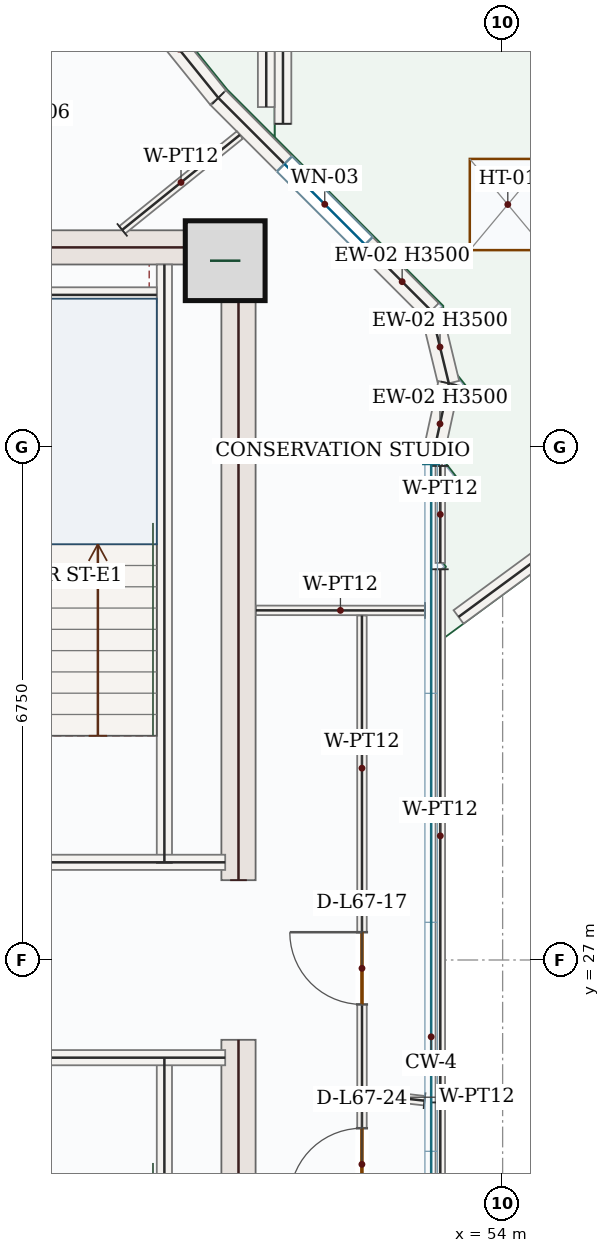
"""IFC4 building model, lengths in metres.
Left out: names, types, materials, properties, quantities, classifications, styles, units other than length and angle.
Written with IfcOpenShell. Run it as: python <this file> out.ifc"""

import sys

from ifc_helpers import new_model, si_unit, direction, frame, frame_2d, origin, origin_2d, place, context, subcontext, project, spatial, rectangle, extrude, source, transform, mapped, element, fill, save


model = new_model("IFC4")
c1 = context("Model", 3, precision=1e-05, world=origin(), true_north=direction((0.0, 1.0)))
c2 = subcontext(c1, "Body", "Model", "MODEL_VIEW")
j1 = project(units=[si_unit("LENGTHUNIT", "METRE"), si_unit("PLANEANGLEUNIT", "RADIAN")], contexts=[c1])
p1 = place(None, origin())
s1 = spatial("IfcSite", under=j1, at=p1, CompositionType="ELEMENT")
p2 = place(p1, origin())
s2 = spatial("IfcBuilding", under=s1, at=p2, CompositionType="ELEMENT")
p3 = place(p2, frame((0.0, 0.0, 280.35)))
s3 = spatial("IfcBuildingStorey", under=s2, at=p3, CompositionType="ELEMENT", Elevation=280.35)
m1 = source(origin(), c2, "Body", "SweptSolid", [
    extrude(rectangle(XDim=8.55, YDim=0.45, at=frame_2d((4.275, 0.0))), origin(), (0.0, 0.0, 1.0), 3.5),
])
for number, where, z_axis, x_axis in (
    (1, (50.525, 17.4, 0.0), (0.0, 0.0, 1.0), (0.0, 1.0, 0.0)),
    (2, (50.525, 28.05, 0.0), (0.0, 0.0, 1.0), (0.0, 1.0, 0.0)),
):
    element("IfcWall", number, at=place(p3, frame(where, z_axis=z_axis, x_axis=x_axis)), inside=s3, PredefinedType="SHEAR", context=c2, shape_type="MappedRepresentation", body=[
        mapped(m1, transform((0.0, 0.0, 0.0), x_axis=(1.0, 0.0, 0.0), y_axis=(0.0, 1.0, 0.0), z_axis=(0.0, 0.0, 1.0), scale=1.0)),
    ])
m2 = source(origin(), c2, "Body", "SweptSolid", [
    extrude(rectangle(XDim=7.1, YDim=0.45, at=frame_2d((3.55, 0.0))), origin(), (0.0, 0.0, 1.0), 3.5),
])
p4 = place(p3, frame((43.2, 36.375, 0.0), z_axis=(0.0, 0.0, 1.0), x_axis=(1.0, 0.0, 0.0)))
e3 = element("IfcWall", 3, at=p4, inside=s3, PredefinedType="SHEAR", context=c2, shape_type="MappedRepresentation", body=[
    mapped(m2, transform((0.0, 0.0, 0.0), x_axis=(1.0, 0.0, 0.0), y_axis=(0.0, 1.0, 0.0), z_axis=(0.0, 0.0, 1.0), scale=1.0)),
])
m3 = source(origin(), c2, "Body", "SweptSolid", [
    extrude(rectangle(XDim=1.05, YDim=1.05, at=origin_2d()), origin(), (0.0, 0.0, 1.0), 3.75),
])
p5 = place(p3, frame((50.35, 36.2, 0.0), z_axis=(0.0, 0.0, 1.0), x_axis=(1.0, 0.0, 0.0)))
e4 = element("IfcColumn", 4, at=p5, inside=s3, PredefinedType="COLUMN", context=c2, shape_type="MappedRepresentation", body=[
    mapped(m3, transform((0.0, 0.0, 0.0), x_axis=(1.0, 0.0, 0.0), y_axis=(0.0, 1.0, 0.0), z_axis=(0.0, 0.0, 1.0), scale=1.0)),
])
m4 = source(origin(), c2, "Body", "SweptSolid", [
    extrude(rectangle(XDim=9.514, YDim=0.22, at=frame_2d((4.757, 0.0))), origin(), (0.0, 0.0, 1.0), 1.2),
])
p6 = place(p3, frame((51.11, 43.737, 0.0), z_axis=(0.0, 0.0, 1.0), x_axis=(0.592724500616, -0.805405280818, 0.0)))
e5 = element("IfcWall", 5, at=p6, inside=s3, PredefinedType="PARAPET", context=c2, shape_type="MappedRepresentation", body=[
    mapped(m4, transform((0.0, 0.0, 0.0), x_axis=(1.0, 0.0, 0.0), y_axis=(0.0, 1.0, 0.0), z_axis=(0.0, 0.0, 1.0), scale=1.0)),
])
m5 = source(origin(), c2, "Body", "SweptSolid", [
    extrude(rectangle(XDim=3.685, YDim=0.22, at=frame_2d((1.842, 0.0))), origin(), (0.0, 0.0, 1.0), 1.2),
])
p7 = place(p3, frame((56.388, 33.697, 0.0), z_axis=(0.0, 0.0, 1.0), x_axis=(-0.805437043351, -0.592681338662, 0.0)))
e6 = element("IfcWall", 6, at=p7, inside=s3, PredefinedType="PARAPET", context=c2, shape_type="MappedRepresentation", body=[
    mapped(m5, transform((0.0, 0.0, 0.0), x_axis=(1.0, 0.0, 0.0), y_axis=(0.0, 1.0, 0.0), z_axis=(0.0, 0.0, 1.0), scale=1.0)),
])
m6 = source(origin(), c2, "Body", "SweptSolid", [
    extrude(rectangle(XDim=5.736, YDim=0.22, at=frame_2d((2.868, 0.0))), origin(), (0.0, 0.0, 1.0), 1.2),
])
p8 = place(p3, frame((51.11, 38.001, 0.0), z_axis=(0.0, 0.0, 1.0), x_axis=(0.0, 1.0, 0.0)))
e7 = element("IfcWall", 7, at=p8, inside=s3, PredefinedType="PARAPET", context=c2, shape_type="MappedRepresentation", body=[
    mapped(m6, transform((0.0, 0.0, 0.0), x_axis=(1.0, 0.0, 0.0), y_axis=(0.0, 1.0, 0.0), z_axis=(0.0, 0.0, 1.0), scale=1.0)),
])
m7 = source(origin(), c2, "Body", "SweptSolid", [
    extrude(rectangle(XDim=5.815, YDim=0.22, at=frame_2d((2.907, 0.0))), origin(), (0.0, 0.0, 1.0), 1.2),
])
p9 = place(p3, frame((50.89, 44.036, 0.0), z_axis=(0.0, 0.0, 1.0), x_axis=(0.0, -1.0, 0.0)))
e8 = element("IfcWall", 8, at=p9, inside=s3, PredefinedType="PARAPET", context=c2, shape_type="MappedRepresentation", body=[
    mapped(m7, transform((0.0, 0.0, 0.0), x_axis=(1.0, 0.0, 0.0), y_axis=(0.0, 1.0, 0.0), z_axis=(0.0, 0.0, 1.0), scale=1.0)),
])
p10 = place(p3, frame((47.06, 42.305, 0.0), z_axis=(0.0, 0.0, 1.0), x_axis=(0.628225517447, -0.778031297075, 0.0)))
e9 = element("IfcWall", 9, at=p10, inside=s3, PredefinedType="SOLIDWALL", context=c2, shape_type="SweptSolid", body=[
    extrude(rectangle(XDim=5.093, YDim=0.28, at=frame_2d((2.546, 0.0))), origin(), (0.0, 0.0, 1.0), 3.5),
])
p11 = place(p10, frame((1.796, 0.0, 0.85)))
e10 = element("IfcOpeningElement", 10, at=p11, cuts=e9, PredefinedType="OPENING", context=c2, shape_type="SweptSolid", body=[
    extrude(rectangle(XDim=1.5, YDim=1.5, at=frame_2d((0.75, 0.75))), frame((0.0, 0.15, 0.0), z_axis=(0.0, -1.0, 0.0), x_axis=(1.0, 0.0, 0.0)), (0.0, 0.0, 1.0), 0.3),
])
p12 = place(p3, frame((50.26, 38.342, 0.0), z_axis=(0.0, 0.0, 1.0), x_axis=(0.707106781187, -0.707106781187, 0.0)))
e11 = element("IfcWall", 11, at=p12, inside=s3, PredefinedType="SOLIDWALL", context=c2, shape_type="SweptSolid", body=[
    extrude(rectangle(XDim=3.96, YDim=0.28, at=frame_2d((1.98, 0.0))), origin(), (0.0, 0.0, 1.0), 3.5),
])
p13 = place(p12, frame((1.23, 0.0, 0.85)))
e12 = element("IfcOpeningElement", 12, at=p13, cuts=e11, PredefinedType="OPENING", context=c2, shape_type="SweptSolid", body=[
    extrude(rectangle(XDim=1.5, YDim=1.5, at=frame_2d((0.75, 0.75))), frame((0.0, 0.15, 0.0), z_axis=(0.0, -1.0, 0.0), x_axis=(1.0, 0.0, 0.0)), (0.0, 0.0, 1.0), 0.3),
])
m8 = source(origin(), c2, "Body", "SweptSolid", [
    extrude(rectangle(XDim=0.983, YDim=0.28, at=frame_2d((0.492, 0.0))), origin(), (0.0, 0.0, 1.0), 3.5),
])
p14 = place(p3, frame((53.06, 35.542, 0.0), z_axis=(0.0, 0.0, 1.0), x_axis=(0.235870049888, -0.971784605541, 0.0)))
e13 = element("IfcWall", 13, at=p14, inside=s3, PredefinedType="SOLIDWALL", context=c2, shape_type="MappedRepresentation", body=[
    mapped(m8, transform((0.0, 0.0, 0.0), x_axis=(1.0, 0.0, 0.0), y_axis=(0.0, 1.0, 0.0), z_axis=(0.0, 0.0, 1.0), scale=1.0)),
])
m9 = source(origin(), c2, "Body", "SweptSolid", [
    extrude(rectangle(XDim=1.091, YDim=0.28, at=frame_2d((0.545, 0.0))), origin(), (0.0, 0.0, 1.0), 3.5),
])
p15 = place(p3, frame((53.292, 34.586, 0.0), z_axis=(0.0, 0.0, 1.0), x_axis=(-0.212661978508, -0.977125827566, 0.0)))
e14 = element("IfcWall", 14, at=p15, inside=s3, PredefinedType="SOLIDWALL", context=c2, shape_type="MappedRepresentation", body=[
    mapped(m9, transform((0.0, 0.0, 0.0), x_axis=(1.0, 0.0, 0.0), y_axis=(0.0, 1.0, 0.0), z_axis=(0.0, 0.0, 1.0), scale=1.0)),
])
m10 = source(origin(), c2, "Body", "SweptSolid", [
    extrude(rectangle(XDim=7.87, YDim=0.2, at=frame_2d((3.935, 0.0))), origin(), (0.0, 0.0, 1.0), 3.5),
])
for number, where, z_axis, x_axis in (
    (15, (49.55, 17.85, 0.0), (0.0, 0.0, 1.0), (0.0, 1.0, 0.0)),
    (16, (49.55, 28.28, 0.0), (0.0, 0.0, 1.0), (0.0, 1.0, 0.0)),
):
    element("IfcWall", number, at=place(p3, frame(where, z_axis=z_axis, x_axis=x_axis)), inside=s3, PredefinedType="SOLIDWALL", context=c2, shape_type="MappedRepresentation", body=[
        mapped(m10, transform((0.0, 0.0, 0.0), x_axis=(1.0, 0.0, 0.0), y_axis=(0.0, 1.0, 0.0), z_axis=(0.0, 0.0, 1.0), scale=1.0)),
    ])
m11 = source(origin(), c2, "Body", "SweptSolid", [
    extrude(rectangle(XDim=4.25, YDim=0.2, at=frame_2d((2.125, 0.0))), origin(), (0.0, 0.0, 1.0), 3.5),
])
for number, where, z_axis, x_axis in (
    (17, (46.1, 25.715, 0.0), (0.0, 0.0, 1.0), (1.0, 0.0, 0.0)),
    (18, (46.1, 28.285, 0.0), (0.0, 0.0, 1.0), (1.0, 0.0, 0.0)),
):
    element("IfcWall", number, at=place(p3, frame(where, z_axis=z_axis, x_axis=x_axis)), inside=s3, PredefinedType="SOLIDWALL", context=c2, shape_type="MappedRepresentation", body=[
        mapped(m11, transform((0.0, 0.0, 0.0), x_axis=(1.0, 0.0, 0.0), y_axis=(0.0, 1.0, 0.0), z_axis=(0.0, 0.0, 1.0), scale=1.0)),
    ])
m12 = source(origin(), c2, "Body", "SweptSolid", [
    extrude(rectangle(XDim=3.25, YDim=0.2, at=frame_2d((1.625, 0.0))), origin(), (0.0, 0.0, 1.0), 3.5),
])
p16 = place(p3, frame((46.2, 35.75, 0.0), z_axis=(0.0, 0.0, 1.0), x_axis=(1.0, 0.0, 0.0)))
e19 = element("IfcWall", 19, at=p16, inside=s3, PredefinedType="SOLIDWALL", context=c2, shape_type="MappedRepresentation", body=[
    mapped(m12, transform((0.0, 0.0, 0.0), x_axis=(1.0, 0.0, 0.0), y_axis=(0.0, 1.0, 0.0), z_axis=(0.0, 0.0, 1.0), scale=1.0)),
])
m13 = source(origin(), c2, "Body", "SweptSolid", [
    extrude(rectangle(XDim=2.223, YDim=0.125, at=frame_2d((1.111, 0.0))), origin(), (0.0, 0.0, 1.0), 3.5),
])
p17 = place(p3, frame((52.978, 31.598, 0.0), z_axis=(0.0, 0.0, 1.0), x_axis=(-0.999999704402, 0.000768892567, 0.0)))
e20 = element("IfcWall", 20, at=p17, inside=s3, PredefinedType="PARTITIONING", context=c2, shape_type="MappedRepresentation", body=[
    mapped(m13, transform((0.0, 0.0, 0.0), x_axis=(1.0, 0.0, 0.0), y_axis=(0.0, 1.0, 0.0), z_axis=(0.0, 0.0, 1.0), scale=1.0)),
])
m14 = source(origin(), c2, "Body", "SweptSolid", [
    extrude(rectangle(XDim=1.989, YDim=0.125, at=frame_2d((0.995, 0.0))), origin(), (0.0, 0.0, 1.0), 3.5),
])
p18 = place(p3, frame((48.995, 36.605, 0.0), z_axis=(0.0, 0.0, 1.0), x_axis=(0.778058853423, 0.628191388519, 0.0)))
e21 = element("IfcWall", 21, at=p18, inside=s3, PredefinedType="PARTITIONING", context=c2, shape_type="MappedRepresentation", body=[
    mapped(m14, transform((0.0, 0.0, 0.0), x_axis=(1.0, 0.0, 0.0), y_axis=(0.0, 1.0, 0.0), z_axis=(0.0, 0.0, 1.0), scale=1.0)),
])
m15 = source(origin(), c2, "Body", "SweptSolid", [
    extrude(rectangle(XDim=1.276, YDim=0.125, at=frame_2d((0.638, 0.0))), origin(), (0.0, 0.0, 1.0), 3.5),
])
p19 = place(p3, frame((53.18, 33.5, 0.0), z_axis=(0.0, 0.0, 1.0), x_axis=(0.0, -1.0, 0.0)))
e22 = element("IfcWall", 22, at=p19, inside=s3, PredefinedType="PARTITIONING", context=c2, shape_type="MappedRepresentation", body=[
    mapped(m15, transform((0.0, 0.0, 0.0), x_axis=(1.0, 0.0, 0.0), y_axis=(0.0, 1.0, 0.0), z_axis=(0.0, 0.0, 1.0), scale=1.0)),
])
m16 = source(origin(), c2, "Body", "SweptSolid", [
    extrude(rectangle(XDim=7.014, YDim=0.125, at=frame_2d((3.507, 0.0))), origin(), (0.0, 0.0, 1.0), 3.5),
])
p20 = place(p3, frame((53.18, 32.14, 0.0), z_axis=(0.0, 0.0, 1.0), x_axis=(0.0, -1.0, 0.0)))
e23 = element("IfcWall", 23, at=p20, inside=s3, PredefinedType="PARTITIONING", context=c2, shape_type="MappedRepresentation", body=[
    mapped(m16, transform((0.0, 0.0, 0.0), x_axis=(1.0, 0.0, 0.0), y_axis=(0.0, 1.0, 0.0), z_axis=(0.0, 0.0, 1.0), scale=1.0)),
])
m17 = source(origin(), c2, "Body", "SweptSolid", [
    extrude(rectangle(XDim=0.828, YDim=0.125, at=frame_2d((0.414, 0.0))), origin(), (0.0, 0.0, 1.0), 3.5),
])
p21 = place(p3, frame((52.972, 25.149, 0.0), z_axis=(0.0, 0.0, 1.0), x_axis=(-0.993862130166, 0.110625793652, 0.0)))
e24 = element("IfcWall", 24, at=p21, inside=s3, PredefinedType="PARTITIONING", context=c2, shape_type="MappedRepresentation", body=[
    mapped(m17, transform((0.0, 0.0, 0.0), x_axis=(1.0, 0.0, 0.0), y_axis=(0.0, 1.0, 0.0), z_axis=(0.0, 0.0, 1.0), scale=1.0)),
])
p22 = place(p3, frame((52.15, 25.24, 0.0), z_axis=(0.0, 0.0, 1.0), x_axis=(-0.000155231293, 0.999999987952, 0.0)))
e25 = element("IfcWall", 25, at=p22, inside=s3, PredefinedType="PARTITIONING", context=c2, shape_type="SweptSolid", body=[
    extrude(rectangle(XDim=6.291, YDim=0.125, at=frame_2d((3.146, 0.0))), origin(), (0.0, 0.0, 1.0), 3.5),
])
p23 = place(p22, frame((1.175, 0.0, 0.0)))
e26 = element("IfcOpeningElement", 26, at=p23, cuts=e25, PredefinedType="OPENING", context=c2, shape_type="SweptSolid", body=[
    extrude(rectangle(XDim=0.95, YDim=2.15, at=frame_2d((0.475, 1.075))), frame((0.0, 0.073, 0.0), z_axis=(0.0, -1.0, 0.0), x_axis=(1.0, 0.0, 0.0)), (0.0, 0.0, 1.0), 0.145),
])
p24 = place(p3, frame((52.146, 22.468, 0.0), z_axis=(0.0, 0.0, 1.0), x_axis=(0.001263765014, 0.999999201449, 0.0)))
e27 = element("IfcWall", 27, at=p24, inside=s3, PredefinedType="PARTITIONING", context=c2, shape_type="SweptSolid", body=[
    extrude(rectangle(XDim=2.705, YDim=0.125, at=frame_2d((1.352, 0.0))), origin(), (0.0, 0.0, 1.0), 3.5),
])
p25 = place(p24, frame((1.369, 0.0, 0.0)))
e28 = element("IfcOpeningElement", 28, at=p25, cuts=e27, PredefinedType="OPENING", context=c2, shape_type="SweptSolid", body=[
    extrude(rectangle(XDim=0.95, YDim=2.15, at=frame_2d((0.475, 1.075))), frame((0.0, 0.073, 0.0), z_axis=(0.0, -1.0, 0.0), x_axis=(1.0, 0.0, 0.0)), (0.0, 0.0, 1.0), 0.145),
])
m18 = source(origin(), c2, "Body", "SweptSolid", [
    extrude(rectangle(XDim=6.718, YDim=0.125, at=frame_2d((3.359, 0.0))), origin(), (0.0, 0.0, 1.0), 3.5),
])
p26 = place(p3, frame((53.18, 25.126, 0.0), z_axis=(0.0, 0.0, 1.0), x_axis=(0.0, -1.0, 0.0)))
e29 = element("IfcWall", 29, at=p26, inside=s3, PredefinedType="PARTITIONING", context=c2, shape_type="MappedRepresentation", body=[
    mapped(m18, transform((0.0, 0.0, 0.0), x_axis=(1.0, 0.0, 0.0), y_axis=(0.0, 1.0, 0.0), z_axis=(0.0, 0.0, 1.0), scale=1.0)),
])
p27 = place(p3, frame((0.0, 0.0, -0.22)))
p28 = place(p27, frame((54.068, 36.939, 0.0)))
p29 = place(p28, frame((0.0, 0.0, 0.22)))
e30 = element("IfcDoor", 30, at=p29, inside=s3, OperationType="SINGLE_SWING_LEFT", PredefinedType="TRAPDOOR", context=c2, shape_type="SweptSolid", body=[
    extrude(rectangle(XDim=1.0, YDim=1.2, at=origin_2d()), origin(), (0.0, 0.0, 1.0), 0.05),
])
m19 = source(origin(), c2, "Body", "SweptSolid", [
    extrude(rectangle(XDim=1.5, YDim=1.5, at=frame_2d((0.75, 0.75))), frame((0.0, 0.03, 0.0), z_axis=(0.0, -1.0, 0.0), x_axis=(1.0, 0.0, 0.0)), (0.0, 0.0, 1.0), 0.06),
])
p30 = place(p13, origin())
e31 = element("IfcWindow", 31, at=p30, inside=s3, PartitioningType="SINGLE_PANEL", PredefinedType="WINDOW", context=c2, shape_type="MappedRepresentation", body=[
    mapped(m19, transform((0.0, 0.0, 0.0), x_axis=(1.0, 0.0, 0.0), y_axis=(0.0, 1.0, 0.0), z_axis=(0.0, 0.0, 1.0), scale=1.0)),
])
fill(e12, e31)
m20 = source(origin(), c2, "Body", "SweptSolid", [
    extrude(rectangle(XDim=0.95, YDim=2.15, at=frame_2d((0.475, 1.075))), frame((0.0, 0.025, 0.0), z_axis=(0.0, -1.0, 0.0), x_axis=(1.0, 0.0, 0.0)), (0.0, 0.0, 1.0), 0.05),
])
p31 = place(p23, origin())
e32 = element("IfcDoor", 32, at=p31, inside=s3, OperationType="SINGLE_SWING_RIGHT", PredefinedType="DOOR", context=c2, shape_type="MappedRepresentation", body=[
    mapped(m20, transform((0.0, 0.0, 0.0), x_axis=(1.0, 0.0, 0.0), y_axis=(0.0, 1.0, 0.0), z_axis=(0.0, 0.0, 1.0), scale=1.0)),
])
fill(e26, e32)
p32 = place(p25, origin())
e33 = element("IfcDoor", 33, at=p32, inside=s3, OperationType="SINGLE_SWING_LEFT", PredefinedType="DOOR", context=c2, shape_type="MappedRepresentation", body=[
    mapped(m20, transform((0.0, 0.0, 0.0), x_axis=(1.0, 0.0, 0.0), y_axis=(0.0, 1.0, 0.0), z_axis=(0.0, 0.0, 1.0), scale=1.0)),
])
fill(e28, e33)
save(model, sys.argv[1])
